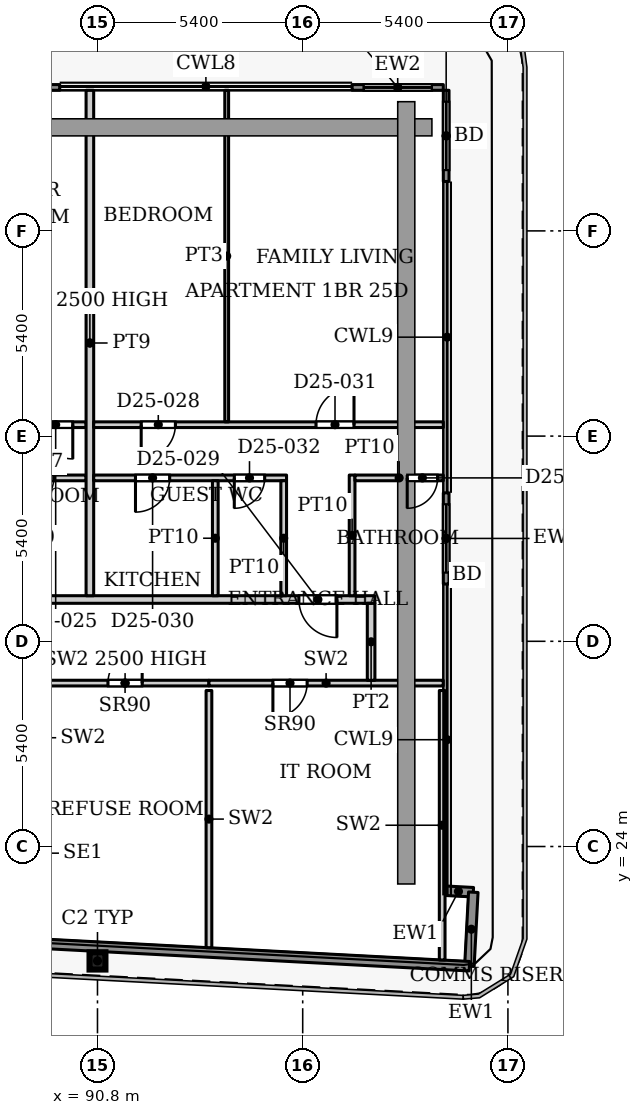
"""IFC4 building model, lengths in metres.
Left out: names, types, materials, properties, quantities, classifications, styles, units other than length and angle.
Written with IfcOpenShell. Run it as: python <this file> out.ifc"""

import sys

from ifc_helpers import new_model, si_unit, direction, frame, frame_2d, origin, origin_2d, place, context, subcontext, project, spatial, rectangle, i_section, extrude, source, transform, mapped, element, fill, save


model = new_model("IFC4")
c1 = context("Model", 3, precision=1e-05, world=origin(), true_north=direction((0.0, 1.0)))
c2 = subcontext(c1, "Body", "Model", "MODEL_VIEW")
j1 = project(units=[si_unit("LENGTHUNIT", "METRE"), si_unit("PLANEANGLEUNIT", "RADIAN")], contexts=[c1])
p1 = place(None, origin())
s1 = spatial("IfcSite", under=j1, at=p1, CompositionType="ELEMENT")
p2 = place(p1, origin())
s2 = spatial("IfcBuilding", under=s1, at=p2, CompositionType="ELEMENT")
p3 = place(p2, frame((0.0, 0.0, 109.7)))
s3 = spatial("IfcBuildingStorey", under=s2, at=p3, CompositionType="ELEMENT", Elevation=109.7)
p4 = place(p3, frame((90.8, 20.99, 0.0), z_axis=(0.0, 0.0, 1.0), x_axis=(1.0, 0.0, 0.0)))
e1 = element("IfcColumn", 1, at=p4, inside=s3, PredefinedType="COLUMN", context=c2, shape_type="SweptSolid", body=[
    extrude(i_section(OverallWidth=0.418, OverallDepth=0.455, WebThickness=0.042, FlangeThickness=0.068, FilletRadius=0.014, at=origin_2d()), origin(), (0.0, 0.0, 1.0), 3.9),
])
p5 = place(p3, frame((87.406, 43.975, 0.0), z_axis=(0.0, 0.0, 1.0), x_axis=(1.0, 0.0, 0.0)))
e2 = element("IfcWall", 2, at=p5, inside=s3, PredefinedType="SOLIDWALL", context=c2, shape_type="SweptSolid", body=[
    extrude(rectangle(XDim=2.4, YDim=0.15, at=frame_2d((1.2, 0.0))), origin(), (0.0, 0.0, 1.0), 3.75),
])
p6 = place(p5, frame((0.3, 0.0, 0.0)))
e3 = element("IfcOpeningElement", 3, at=p6, cuts=e2, PredefinedType="OPENING", context=c2, shape_type="SweptSolid", body=[
    extrude(rectangle(XDim=1.8, YDim=2.4, at=frame_2d((0.9, 1.2))), frame((0.0, 0.085, 0.0), z_axis=(0.0, -1.0, 0.0), x_axis=(1.0, 0.0, 0.0)), (0.0, 0.0, 1.0), 0.17),
])
p7 = place(p3, frame((97.5, 43.975, 0.0), z_axis=(0.0, 0.0, 1.0), x_axis=(1.0, 0.0, 0.0)))
e4 = element("IfcWall", 4, at=p7, inside=s3, PredefinedType="SOLIDWALL", context=c2, shape_type="SweptSolid", body=[
    extrude(rectangle(XDim=2.4, YDim=0.15, at=frame_2d((1.2, 0.0))), origin(), (0.0, 0.0, 1.0), 3.75),
])
p8 = place(p7, frame((0.3, 0.0, 0.0)))
e5 = element("IfcOpeningElement", 5, at=p8, cuts=e4, PredefinedType="OPENING", context=c2, shape_type="SweptSolid", body=[
    extrude(rectangle(XDim=1.8, YDim=2.4, at=frame_2d((0.9, 1.2))), frame((0.0, 0.085, 0.0), z_axis=(0.0, -1.0, 0.0), x_axis=(1.0, 0.0, 0.0)), (0.0, 0.0, 1.0), 0.17),
])
p9 = place(p3, frame((99.975, 43.9, 0.0), z_axis=(0.0, 0.0, 1.0), x_axis=(0.0, -1.0, 0.0)))
e6 = element("IfcWall", 6, at=p9, inside=s3, PredefinedType="SOLIDWALL", context=c2, shape_type="SweptSolid", body=[
    extrude(rectangle(XDim=2.4, YDim=0.15, at=frame_2d((1.2, 0.0))), origin(), (0.0, 0.0, 1.0), 3.75),
])
p10 = place(p9, frame((0.3, 0.0, 0.0)))
e7 = element("IfcOpeningElement", 7, at=p10, cuts=e6, PredefinedType="OPENING", context=c2, shape_type="SweptSolid", body=[
    extrude(rectangle(XDim=1.8, YDim=2.4, at=frame_2d((0.9, 1.2))), frame((0.0, 0.085, 0.0), z_axis=(0.0, -1.0, 0.0), x_axis=(1.0, 0.0, 0.0)), (0.0, 0.0, 1.0), 0.17),
])
p11 = place(p3, frame((99.975, 33.307, 0.0), z_axis=(0.0, 0.0, 1.0), x_axis=(0.0, -1.0, 0.0)))
e8 = element("IfcWall", 8, at=p11, inside=s3, PredefinedType="SOLIDWALL", context=c2, shape_type="SweptSolid", body=[
    extrude(rectangle(XDim=2.4, YDim=0.15, at=frame_2d((1.2, 0.0))), origin(), (0.0, 0.0, 1.0), 3.75),
])
p12 = place(p11, frame((0.3, 0.0, 0.0)))
e9 = element("IfcOpeningElement", 9, at=p12, cuts=e8, PredefinedType="OPENING", context=c2, shape_type="SweptSolid", body=[
    extrude(rectangle(XDim=1.8, YDim=2.4, at=frame_2d((0.9, 1.2))), frame((0.0, 0.085, 0.0), z_axis=(0.0, -1.0, 0.0), x_axis=(1.0, 0.0, 0.0)), (0.0, 0.0, 1.0), 0.17),
])
p13 = place(p3, frame((99.907, 22.839, 0.0), z_axis=(0.0, 0.0, 1.0), x_axis=(0.998561284263, -0.053622398031, 0.0)))
e10 = element("IfcWall", 10, at=p13, inside=s3, PredefinedType="SOLIDWALL", context=c2, shape_type="SweptSolid", body=[
    extrude(rectangle(XDim=0.783, YDim=0.25, at=frame_2d((0.392, 0.0))), origin(), (0.0, 0.0, 1.0), 3.75),
])
p14 = place(p3, frame((100.689, 22.797, 0.0), z_axis=(0.0, 0.0, 1.0), x_axis=(-0.052841433274, -0.998602915542, 0.0)))
e11 = element("IfcWall", 11, at=p14, inside=s3, PredefinedType="SOLIDWALL", context=c2, shape_type="SweptSolid", body=[
    extrude(rectangle(XDim=1.95, YDim=0.25, at=frame_2d((0.975, 0.0))), origin(), (0.0, 0.0, 1.0), 3.75),
])
p15 = place(p3, frame((100.586, 20.85, 0.0), z_axis=(0.0, 0.0, 1.0), x_axis=(-0.99861746497, 0.052565755559, 0.0)))
e12 = element("IfcWall", 12, at=p15, inside=s3, PredefinedType="SOLIDWALL", context=c2, shape_type="SweptSolid", body=[
    extrude(rectangle(XDim=66.639, YDim=0.25, at=frame_2d((33.319, 0.0))), origin(), (0.0, 0.0, 1.0), 3.75),
])
p16 = place(p3, frame((89.32, 28.3, 0.0), z_axis=(0.0, 0.0, 1.0), x_axis=(1.0, 0.0, 0.0)))
e13 = element("IfcWall", 13, at=p16, inside=s3, PredefinedType="PARTITIONING", context=c2, shape_type="SweptSolid", body=[
    extrude(rectangle(XDim=4.413, YDim=0.15, at=frame_2d((2.207, 0.0))), origin(), (0.0, 0.0, 1.0), 2.5),
])
p17 = place(p16, frame((1.756, 0.0, 0.0)))
e14 = element("IfcOpeningElement", 14, at=p17, cuts=e13, PredefinedType="OPENING", context=c2, shape_type="SweptSolid", body=[
    extrude(rectangle(XDim=0.9, YDim=2.2, at=frame_2d((0.45, 1.1))), frame((0.0, 0.085, 0.0), z_axis=(0.0, -1.0, 0.0), x_axis=(1.0, 0.0, 0.0)), (0.0, 0.0, 1.0), 0.17),
])
p18 = place(p3, frame((93.733, 21.338, 0.0), z_axis=(0.0, 0.0, 1.0), x_axis=(0.0, 1.0, 0.0)))
e15 = element("IfcWall", 15, at=p18, inside=s3, PredefinedType="PARTITIONING", context=c2, shape_type="SweptSolid", body=[
    extrude(rectangle(XDim=6.767, YDim=0.15, at=frame_2d((3.384, 0.0))), origin(), (0.0, 0.0, 1.0), 3.9),
])
p19 = place(p3, frame((93.733, 28.3, 0.0), z_axis=(0.0, 0.0, 1.0), x_axis=(1.0, 0.0, 0.0)))
e16 = element("IfcWall", 16, at=p19, inside=s3, PredefinedType="PARTITIONING", context=c2, shape_type="SweptSolid", body=[
    extrude(rectangle(XDim=6.165, YDim=0.15, at=frame_2d((3.083, 0.0))), origin(), (0.0, 0.0, 1.0), 3.9),
])
p20 = place(p19, frame((1.683, 0.0, 0.0)))
e17 = element("IfcOpeningElement", 17, at=p20, cuts=e16, PredefinedType="OPENING", context=c2, shape_type="SweptSolid", body=[
    extrude(rectangle(XDim=0.9, YDim=2.2, at=frame_2d((0.45, 1.1))), frame((0.0, 0.085, 0.0), z_axis=(0.0, -1.0, 0.0), x_axis=(1.0, 0.0, 0.0)), (0.0, 0.0, 1.0), 0.17),
])
p21 = place(p3, frame((99.87, 21.015, 0.0), z_axis=(0.0, 0.0, 1.0), x_axis=(0.0, 1.0, 0.0)))
e18 = element("IfcWall", 18, at=p21, inside=s3, PredefinedType="PARTITIONING", context=c2, shape_type="SweptSolid", body=[
    extrude(rectangle(XDim=7.09, YDim=0.15, at=frame_2d((3.545, 0.0))), origin(), (0.0, 0.0, 1.0), 3.9),
])
p22 = place(p3, frame((55.9, 30.5, 0.0), z_axis=(0.0, 0.0, 1.0), x_axis=(1.0, 0.0, 0.0)))
e19 = element("IfcWall", 19, at=p22, inside=s3, PredefinedType="PARTITIONING", context=c2, shape_type="SweptSolid", body=[
    extrude(rectangle(XDim=42.2, YDim=0.2, at=frame_2d((21.1, 0.0))), origin(), (0.0, 0.0, 1.0), 3.6),
])
p23 = place(p22, frame((9.75, 0.0, 0.0)))
e20 = element("IfcOpeningElement", 20, at=p23, cuts=e19, PredefinedType="OPENING", context=c2, shape_type="SweptSolid", body=[
    extrude(rectangle(XDim=1.0, YDim=2.1, at=frame_2d((0.5, 1.05))), frame((0.0, 0.11, 0.0), z_axis=(0.0, -1.0, 0.0), x_axis=(1.0, 0.0, 0.0)), (0.0, 0.0, 1.0), 0.22),
])
p24 = place(p22, frame((18.6, 0.0, 0.0)))
e21 = element("IfcOpeningElement", 21, at=p24, cuts=e19, PredefinedType="OPENING", context=c2, shape_type="SweptSolid", body=[
    extrude(rectangle(XDim=1.0, YDim=2.1, at=frame_2d((0.5, 1.05))), frame((0.0, 0.11, 0.0), z_axis=(0.0, -1.0, 0.0), x_axis=(1.0, 0.0, 0.0)), (0.0, 0.0, 1.0), 0.22),
])
p25 = place(p22, frame((23.4, 0.0, 0.0)))
e22 = element("IfcOpeningElement", 22, at=p25, cuts=e19, PredefinedType="OPENING", context=c2, shape_type="SweptSolid", body=[
    extrude(rectangle(XDim=1.0, YDim=2.1, at=frame_2d((0.5, 1.05))), frame((0.0, 0.11, 0.0), z_axis=(0.0, -1.0, 0.0), x_axis=(1.0, 0.0, 0.0)), (0.0, 0.0, 1.0), 0.22),
])
p26 = place(p22, frame((40.2, 0.0, 0.0)))
e23 = element("IfcOpeningElement", 23, at=p26, cuts=e19, PredefinedType="OPENING", context=c2, shape_type="SweptSolid", body=[
    extrude(rectangle(XDim=1.0, YDim=2.1, at=frame_2d((0.5, 1.05))), frame((0.0, 0.11, 0.0), z_axis=(0.0, -1.0, 0.0), x_axis=(1.0, 0.0, 0.0)), (0.0, 0.0, 1.0), 0.22),
])
p27 = place(p3, frame((76.0, 35.1, 0.0), z_axis=(0.0, 0.0, 1.0), x_axis=(1.0, 0.0, 0.0)))
e24 = element("IfcWall", 24, at=p27, inside=s3, PredefinedType="PARTITIONING", context=c2, shape_type="SweptSolid", body=[
    extrude(rectangle(XDim=14.5, YDim=0.15, at=frame_2d((7.25, 0.0))), origin(), (0.0, 0.0, 1.0), 3.6),
])
p28 = place(p27, frame((0.95, 0.0, 0.0)))
e25 = element("IfcOpeningElement", 25, at=p28, cuts=e24, PredefinedType="OPENING", context=c2, shape_type="SweptSolid", body=[
    extrude(rectangle(XDim=0.9, YDim=2.1, at=frame_2d((0.45, 1.05))), frame((0.0, 0.085, 0.0), z_axis=(0.0, -1.0, 0.0), x_axis=(1.0, 0.0, 0.0)), (0.0, 0.0, 1.0), 0.17),
])
p29 = place(p27, frame((6.65, 0.0, 0.0)))
e26 = element("IfcOpeningElement", 26, at=p29, cuts=e24, PredefinedType="OPENING", context=c2, shape_type="SweptSolid", body=[
    extrude(rectangle(XDim=0.9, YDim=2.1, at=frame_2d((0.45, 1.05))), frame((0.0, 0.085, 0.0), z_axis=(0.0, -1.0, 0.0), x_axis=(1.0, 0.0, 0.0)), (0.0, 0.0, 1.0), 0.17),
])
p30 = place(p27, frame((3.9, 0.0, 0.0)))
e27 = element("IfcOpeningElement", 27, at=p30, cuts=e24, PredefinedType="OPENING", context=c2, shape_type="SweptSolid", body=[
    extrude(rectangle(XDim=1.0, YDim=2.1, at=frame_2d((0.5, 1.05))), frame((0.0, 0.085, 0.0), z_axis=(0.0, -1.0, 0.0), x_axis=(1.0, 0.0, 0.0)), (0.0, 0.0, 1.0), 0.17),
])
p31 = place(p27, frame((9.45, 0.0, 0.0)))
e28 = element("IfcOpeningElement", 28, at=p31, cuts=e24, PredefinedType="OPENING", context=c2, shape_type="SweptSolid", body=[
    extrude(rectangle(XDim=0.9, YDim=2.1, at=frame_2d((0.45, 1.05))), frame((0.0, 0.085, 0.0), z_axis=(0.0, -1.0, 0.0), x_axis=(1.0, 0.0, 0.0)), (0.0, 0.0, 1.0), 0.17),
])
p32 = place(p27, frame((13.25, 0.0, 0.0)))
e29 = element("IfcOpeningElement", 29, at=p32, cuts=e24, PredefinedType="OPENING", context=c2, shape_type="SweptSolid", body=[
    extrude(rectangle(XDim=0.9, YDim=2.1, at=frame_2d((0.45, 1.05))), frame((0.0, 0.085, 0.0), z_axis=(0.0, -1.0, 0.0), x_axis=(1.0, 0.0, 0.0)), (0.0, 0.0, 1.0), 0.17),
])
p33 = place(p3, frame((81.525, 33.7, 0.0), z_axis=(0.0, 0.0, 1.0), x_axis=(1.0, 0.0, 0.0)))
e30 = element("IfcWall", 30, at=p33, inside=s3, PredefinedType="PARTITIONING", context=c2, shape_type="SweptSolid", body=[
    extrude(rectangle(XDim=8.975, YDim=0.15, at=frame_2d((4.488, 0.0))), origin(), (0.0, 0.0, 1.0), 3.6),
])
p34 = place(p33, frame((7.325, 0.0, 0.0)))
e31 = element("IfcOpeningElement", 31, at=p34, cuts=e30, PredefinedType="OPENING", context=c2, shape_type="SweptSolid", body=[
    extrude(rectangle(XDim=0.8, YDim=2.1, at=frame_2d((0.4, 1.05))), frame((0.0, 0.085, 0.0), z_axis=(0.0, -1.0, 0.0), x_axis=(1.0, 0.0, 0.0)), (0.0, 0.0, 1.0), 0.17),
])
p35 = place(p33, frame((3.725, 0.0, 0.0)))
e32 = element("IfcOpeningElement", 32, at=p35, cuts=e30, PredefinedType="OPENING", context=c2, shape_type="SweptSolid", body=[
    extrude(rectangle(XDim=0.9, YDim=2.1, at=frame_2d((0.45, 1.05))), frame((0.0, 0.085, 0.0), z_axis=(0.0, -1.0, 0.0), x_axis=(1.0, 0.0, 0.0)), (0.0, 0.0, 1.0), 0.17),
])
p36 = place(p33, frame((0.725, 0.0, 0.0)))
e33 = element("IfcOpeningElement", 33, at=p36, cuts=e30, PredefinedType="OPENING", context=c2, shape_type="SweptSolid", body=[
    extrude(rectangle(XDim=0.8, YDim=2.1, at=frame_2d((0.4, 1.05))), frame((0.0, 0.085, 0.0), z_axis=(0.0, -1.0, 0.0), x_axis=(1.0, 0.0, 0.0)), (0.0, 0.0, 1.0), 0.17),
])
p37 = place(p3, frame((90.6, 30.6, 0.0), z_axis=(0.0, 0.0, 1.0), x_axis=(0.0, 1.0, 0.0)))
e34 = element("IfcWall", 34, at=p37, inside=s3, PredefinedType="PARTITIONING", context=c2, shape_type="SweptSolid", body=[
    extrude(rectangle(XDim=13.3, YDim=0.2, at=frame_2d((6.65, 0.0))), origin(), (0.0, 0.0, 1.0), 2.5),
])
p38 = place(p3, frame((90.7, 33.7, 0.0), z_axis=(0.0, 0.0, 1.0), x_axis=(1.0, 0.0, 0.0)))
e35 = element("IfcWall", 35, at=p38, inside=s3, PredefinedType="PARTITIONING", context=c2, shape_type="SweptSolid", body=[
    extrude(rectangle(XDim=5.075, YDim=0.15, at=frame_2d((2.538, 0.0))), origin(), (0.0, 0.0, 1.0), 3.6),
])
p39 = place(p38, frame((1.1, 0.0, 0.0)))
e36 = element("IfcOpeningElement", 36, at=p39, cuts=e35, PredefinedType="OPENING", context=c2, shape_type="SweptSolid", body=[
    extrude(rectangle(XDim=0.9, YDim=2.1, at=frame_2d((0.45, 1.05))), frame((0.0, 0.085, 0.0), z_axis=(0.0, -1.0, 0.0), x_axis=(1.0, 0.0, 0.0)), (0.0, 0.0, 1.0), 0.17),
])
p40 = place(p38, frame((3.7, 0.0, 0.0)))
e37 = element("IfcOpeningElement", 37, at=p40, cuts=e35, PredefinedType="OPENING", context=c2, shape_type="SweptSolid", body=[
    extrude(rectangle(XDim=0.8, YDim=2.1, at=frame_2d((0.4, 1.05))), frame((0.0, 0.085, 0.0), z_axis=(0.0, -1.0, 0.0), x_axis=(1.0, 0.0, 0.0)), (0.0, 0.0, 1.0), 0.17),
])
p41 = place(p3, frame((90.7, 35.1, 0.0), z_axis=(0.0, 0.0, 1.0), x_axis=(1.0, 0.0, 0.0)))
e38 = element("IfcWall", 38, at=p41, inside=s3, PredefinedType="PARTITIONING", context=c2, shape_type="SweptSolid", body=[
    extrude(rectangle(XDim=9.2, YDim=0.15, at=frame_2d((4.6, 0.0))), origin(), (0.0, 0.0, 1.0), 3.6),
])
p42 = place(p41, frame((1.25, 0.0, 0.0)))
e39 = element("IfcOpeningElement", 39, at=p42, cuts=e38, PredefinedType="OPENING", context=c2, shape_type="SweptSolid", body=[
    extrude(rectangle(XDim=0.9, YDim=2.1, at=frame_2d((0.45, 1.05))), frame((0.0, 0.085, 0.0), z_axis=(0.0, -1.0, 0.0), x_axis=(1.0, 0.0, 0.0)), (0.0, 0.0, 1.0), 0.17),
])
p43 = place(p41, frame((5.85, 0.0, 0.0)))
e40 = element("IfcOpeningElement", 40, at=p43, cuts=e38, PredefinedType="OPENING", context=c2, shape_type="SweptSolid", body=[
    extrude(rectangle(XDim=1.0, YDim=2.1, at=frame_2d((0.5, 1.05))), frame((0.0, 0.085, 0.0), z_axis=(0.0, -1.0, 0.0), x_axis=(1.0, 0.0, 0.0)), (0.0, 0.0, 1.0), 0.17),
])
p44 = place(p3, frame((93.9, 30.6, 0.0), z_axis=(0.0, 0.0, 1.0), x_axis=(0.0, 1.0, 0.0)))
e41 = element("IfcWall", 41, at=p44, inside=s3, PredefinedType="PARTITIONING", context=c2, shape_type="SweptSolid", body=[
    extrude(rectangle(XDim=3.025, YDim=0.15, at=frame_2d((1.512, 0.0))), origin(), (0.0, 0.0, 1.0), 3.6),
])
p45 = place(p3, frame((94.2, 35.175, 0.0), z_axis=(0.0, 0.0, 1.0), x_axis=(0.0, 1.0, 0.0)))
e42 = element("IfcWall", 42, at=p45, inside=s3, PredefinedType="PARTITIONING", context=c2, shape_type="SweptSolid", body=[
    extrude(rectangle(XDim=8.725, YDim=0.1, at=frame_2d((4.362, 0.0))), origin(), (0.0, 0.0, 1.0), 3.6),
])
p46 = place(p3, frame((95.7, 30.6, 0.0), z_axis=(0.0, 0.0, 1.0), x_axis=(0.0, 1.0, 0.0)))
e43 = element("IfcWall", 43, at=p46, inside=s3, PredefinedType="PARTITIONING", context=c2, shape_type="SweptSolid", body=[
    extrude(rectangle(XDim=3.025, YDim=0.15, at=frame_2d((1.512, 0.0))), origin(), (0.0, 0.0, 1.0), 3.6),
])
p47 = place(p3, frame((97.5, 30.6, 0.0), z_axis=(0.0, 0.0, 1.0), x_axis=(0.0, 1.0, 0.0)))
e44 = element("IfcWall", 44, at=p47, inside=s3, PredefinedType="PARTITIONING", context=c2, shape_type="SweptSolid", body=[
    extrude(rectangle(XDim=3.175, YDim=0.15, at=frame_2d((1.587, 0.0))), origin(), (0.0, 0.0, 1.0), 3.6),
])
p48 = place(p3, frame((97.575, 33.7, 0.0), z_axis=(0.0, 0.0, 1.0), x_axis=(1.0, 0.0, 0.0)))
e45 = element("IfcWall", 45, at=p48, inside=s3, PredefinedType="PARTITIONING", context=c2, shape_type="SweptSolid", body=[
    extrude(rectangle(XDim=2.325, YDim=0.15, at=frame_2d((1.163, 0.0))), origin(), (0.0, 0.0, 1.0), 3.6),
])
p49 = place(p48, frame((1.375, 0.0, 0.0)))
e46 = element("IfcOpeningElement", 46, at=p49, cuts=e45, PredefinedType="OPENING", context=c2, shape_type="SweptSolid", body=[
    extrude(rectangle(XDim=0.8, YDim=2.1, at=frame_2d((0.4, 1.05))), frame((0.0, 0.085, 0.0), z_axis=(0.0, -1.0, 0.0), x_axis=(1.0, 0.0, 0.0)), (0.0, 0.0, 1.0), 0.17),
])
p50 = place(p3, frame((98.0, 28.374, 0.0), z_axis=(0.0, 0.0, 1.0), x_axis=(0.0, 1.0, 0.0)))
e47 = element("IfcWall", 47, at=p50, inside=s3, PredefinedType="PARTITIONING", context=c2, shape_type="SweptSolid", body=[
    extrude(rectangle(XDim=2.026, YDim=0.2, at=frame_2d((1.013, 0.0))), origin(), (0.0, 0.0, 1.0), 3.6),
])
m1 = source(origin(), c2, "Body", "SweptSolid", [
    extrude(rectangle(XDim=1.8, YDim=2.4, at=frame_2d((0.9, 1.2))), frame((0.0, 0.025, 0.0), z_axis=(0.0, -1.0, 0.0), x_axis=(1.0, 0.0, 0.0)), (0.0, 0.0, 1.0), 0.05),
])
p51 = place(p8, origin())
e48 = element("IfcDoor", 48, at=p51, inside=s3, OperationType="SLIDING_TO_LEFT", PredefinedType="DOOR", context=c2, shape_type="MappedRepresentation", body=[
    mapped(m1, transform((0.0, 0.0, 0.0), x_axis=(1.0, 0.0, 0.0), y_axis=(0.0, 1.0, 0.0), z_axis=(0.0, 0.0, 1.0), scale=1.0)),
])
fill(e5, e48)
p52 = place(p10, origin())
e49 = element("IfcDoor", 49, at=p52, inside=s3, OperationType="SLIDING_TO_LEFT", PredefinedType="DOOR", context=c2, shape_type="MappedRepresentation", body=[
    mapped(m1, transform((0.0, 0.0, 0.0), x_axis=(1.0, 0.0, 0.0), y_axis=(0.0, 1.0, 0.0), z_axis=(0.0, 0.0, 1.0), scale=1.0)),
])
fill(e7, e49)
p53 = place(p12, origin())
e50 = element("IfcDoor", 50, at=p53, inside=s3, OperationType="SLIDING_TO_LEFT", PredefinedType="DOOR", context=c2, shape_type="MappedRepresentation", body=[
    mapped(m1, transform((0.0, 0.0, 0.0), x_axis=(1.0, 0.0, 0.0), y_axis=(0.0, 1.0, 0.0), z_axis=(0.0, 0.0, 1.0), scale=1.0)),
])
fill(e9, e50)
m2 = source(origin(), c2, "Body", "SweptSolid", [
    extrude(rectangle(XDim=0.9, YDim=2.2, at=frame_2d((0.45, 1.1))), frame((0.0, 0.025, 0.0), z_axis=(0.0, -1.0, 0.0), x_axis=(1.0, 0.0, 0.0)), (0.0, 0.0, 1.0), 0.05),
])
p54 = place(p17, origin())
e51 = element("IfcDoor", 51, at=p54, inside=s3, OperationType="SINGLE_SWING_LEFT", PredefinedType="DOOR", context=c2, shape_type="MappedRepresentation", body=[
    mapped(m2, transform((0.0, 0.0, 0.0), x_axis=(1.0, 0.0, 0.0), y_axis=(0.0, 1.0, 0.0), z_axis=(0.0, 0.0, 1.0), scale=1.0)),
])
fill(e14, e51)
p55 = place(p20, origin())
e52 = element("IfcDoor", 52, at=p55, inside=s3, OperationType="SINGLE_SWING_RIGHT", PredefinedType="DOOR", context=c2, shape_type="MappedRepresentation", body=[
    mapped(m2, transform((0.0, 0.0, 0.0), x_axis=(1.0, 0.0, 0.0), y_axis=(0.0, 1.0, 0.0), z_axis=(0.0, 0.0, 1.0), scale=1.0)),
])
fill(e17, e52)
m3 = source(origin(), c2, "Body", "SweptSolid", [
    extrude(rectangle(XDim=0.8, YDim=2.1, at=frame_2d((0.4, 1.05))), frame((0.0, 0.025, 0.0), z_axis=(0.0, -1.0, 0.0), x_axis=(1.0, 0.0, 0.0)), (0.0, 0.0, 1.0), 0.05),
])
p56 = place(p34, origin())
e53 = element("IfcDoor", 53, at=p56, inside=s3, OperationType="SINGLE_SWING_RIGHT", PredefinedType="DOOR", context=c2, shape_type="MappedRepresentation", body=[
    mapped(m3, transform((0.0, 0.0, 0.0), x_axis=(1.0, 0.0, 0.0), y_axis=(0.0, 1.0, 0.0), z_axis=(0.0, 0.0, 1.0), scale=1.0)),
])
fill(e31, e53)
m4 = source(origin(), c2, "Body", "SweptSolid", [
    extrude(rectangle(XDim=0.9, YDim=2.1, at=frame_2d((0.45, 1.05))), frame((0.0, 0.025, 0.0), z_axis=(0.0, -1.0, 0.0), x_axis=(1.0, 0.0, 0.0)), (0.0, 0.0, 1.0), 0.05),
])
p57 = place(p32, origin())
e54 = element("IfcDoor", 54, at=p57, inside=s3, OperationType="SINGLE_SWING_RIGHT", PredefinedType="DOOR", context=c2, shape_type="MappedRepresentation", body=[
    mapped(m4, transform((0.0, 0.0, 0.0), x_axis=(1.0, 0.0, 0.0), y_axis=(0.0, 1.0, 0.0), z_axis=(0.0, 0.0, 1.0), scale=1.0)),
])
fill(e29, e54)
p58 = place(p49, origin())
e55 = element("IfcDoor", 55, at=p58, inside=s3, OperationType="SINGLE_SWING_RIGHT", PredefinedType="DOOR", context=c2, shape_type="MappedRepresentation", body=[
    mapped(m3, transform((0.0, 0.0, 0.0), x_axis=(1.0, 0.0, 0.0), y_axis=(0.0, 1.0, 0.0), z_axis=(0.0, 0.0, 1.0), scale=1.0)),
])
fill(e46, e55)
p59 = place(p42, origin())
e56 = element("IfcDoor", 56, at=p59, inside=s3, OperationType="SINGLE_SWING_RIGHT", PredefinedType="DOOR", context=c2, shape_type="MappedRepresentation", body=[
    mapped(m4, transform((0.0, 0.0, 0.0), x_axis=(1.0, 0.0, 0.0), y_axis=(0.0, 1.0, 0.0), z_axis=(0.0, 0.0, 1.0), scale=1.0)),
])
fill(e39, e56)
m5 = source(origin(), c2, "Body", "SweptSolid", [
    extrude(rectangle(XDim=1.0, YDim=2.1, at=frame_2d((0.5, 1.05))), frame((0.0, 0.025, 0.0), z_axis=(0.0, -1.0, 0.0), x_axis=(1.0, 0.0, 0.0)), (0.0, 0.0, 1.0), 0.05),
])
p60 = place(p26, origin())
e57 = element("IfcDoor", 57, at=p60, inside=s3, OperationType="SINGLE_SWING_RIGHT", PredefinedType="DOOR", context=c2, shape_type="MappedRepresentation", body=[
    mapped(m5, transform((0.0, 0.0, 0.0), x_axis=(1.0, 0.0, 0.0), y_axis=(0.0, 1.0, 0.0), z_axis=(0.0, 0.0, 1.0), scale=1.0)),
])
fill(e23, e57)
p61 = place(p39, origin())
e58 = element("IfcDoor", 58, at=p61, inside=s3, OperationType="SINGLE_SWING_RIGHT", PredefinedType="DOOR", context=c2, shape_type="MappedRepresentation", body=[
    mapped(m4, transform((0.0, 0.0, 0.0), x_axis=(1.0, 0.0, 0.0), y_axis=(0.0, 1.0, 0.0), z_axis=(0.0, 0.0, 1.0), scale=1.0)),
])
fill(e36, e58)
m6 = source(origin(), c2, "Body", "SweptSolid", [
    extrude(rectangle(XDim=1.0, YDim=2.1, at=frame_2d((0.5, 1.05))), frame((0.0, 0.025, 0.0), z_axis=(0.0, -1.0, 0.0), x_axis=(1.0, 0.0, 0.0)), (0.0, 0.0, 1.0), 0.05),
])
p62 = place(p43, origin())
e59 = element("IfcDoor", 59, at=p62, inside=s3, OperationType="SINGLE_SWING_LEFT", PredefinedType="DOOR", context=c2, shape_type="MappedRepresentation", body=[
    mapped(m6, transform((0.0, 0.0, 0.0), x_axis=(1.0, 0.0, 0.0), y_axis=(0.0, 1.0, 0.0), z_axis=(0.0, 0.0, 1.0), scale=1.0)),
])
fill(e40, e59)
p63 = place(p40, origin())
e60 = element("IfcDoor", 60, at=p63, inside=s3, OperationType="SINGLE_SWING_RIGHT", PredefinedType="DOOR", context=c2, shape_type="MappedRepresentation", body=[
    mapped(m3, transform((0.0, 0.0, 0.0), x_axis=(1.0, 0.0, 0.0), y_axis=(0.0, 1.0, 0.0), z_axis=(0.0, 0.0, 1.0), scale=1.0)),
])
fill(e37, e60)
save(model, sys.argv[1])
